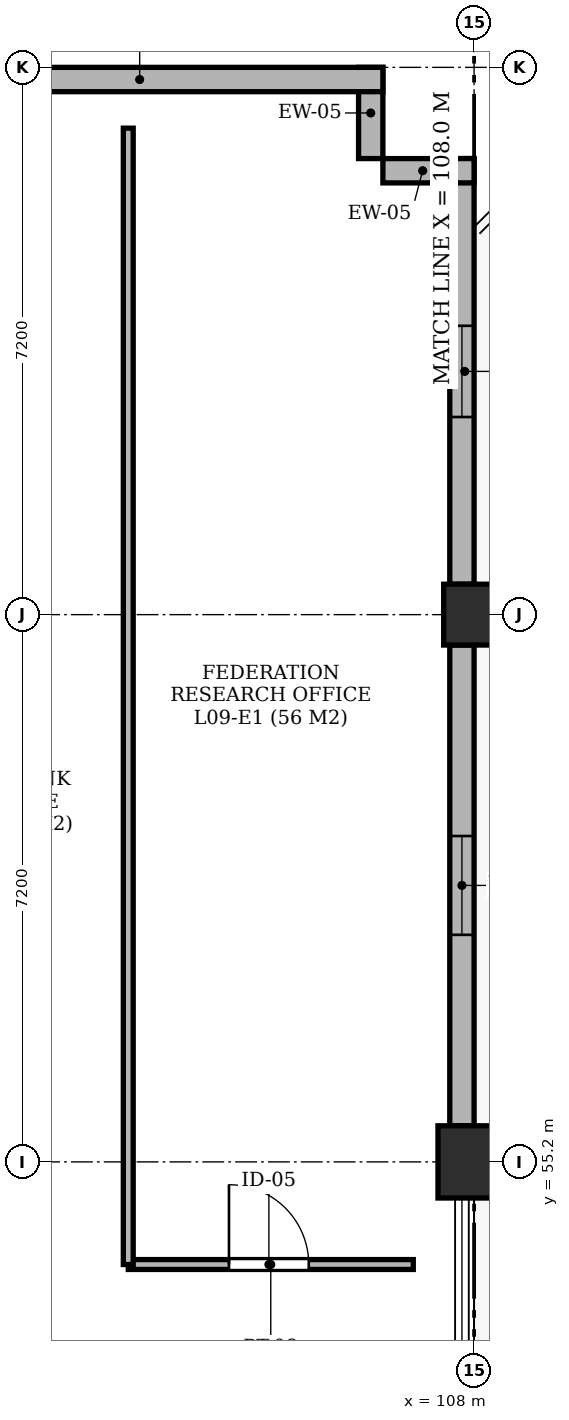
"""IFC4 building model, lengths in metres.
Left out: names, types, materials, properties, quantities, classifications, styles, units other than length and angle.
Written with IfcOpenShell. Run it as: python <this file> out.ifc"""

import sys

from ifc_helpers import new_model, si_unit, direction, frame, frame_2d, origin, origin_2d, place, context, subcontext, project, spatial, rectangle, extrude, element, fill, save


model = new_model("IFC4")
c1 = context("Model", 3, precision=1e-05, world=origin(), true_north=direction((0.0, 1.0)))
c2 = subcontext(c1, "Body", "Model", "MODEL_VIEW")
j1 = project(units=[si_unit("LENGTHUNIT", "METRE"), si_unit("PLANEANGLEUNIT", "RADIAN")], contexts=[c1])
p1 = place(None, origin())
s1 = spatial("IfcSite", under=j1, at=p1, CompositionType="ELEMENT")
p2 = place(p1, origin())
s2 = spatial("IfcBuilding", under=s1, at=p2, CompositionType="ELEMENT")
p3 = place(p2, frame((0.0, 0.0, 40.55)))
s3 = spatial("IfcBuildingStorey", under=s2, at=p3, CompositionType="ELEMENT", Elevation=40.55)
p4 = place(p3, frame((108.0, 55.2, -0.24), z_axis=(0.0, 0.0, 1.0), x_axis=(1.0, 0.0, 0.0)))
e1 = element("IfcColumn", 1, at=p4, inside=s3, PredefinedType="COLUMN", context=c2, shape_type="SweptSolid", body=[
    extrude(rectangle(XDim=0.95, YDim=0.95, at=origin_2d()), origin(), (0.0, 0.0, 1.0), 3.25),
])
p5 = place(p3, frame((108.0, 62.4, -0.24), z_axis=(0.0, 0.0, 1.0), x_axis=(1.0, 0.0, 0.0)))
e2 = element("IfcColumn", 2, at=p5, inside=s3, PredefinedType="COLUMN", context=c2, shape_type="SweptSolid", body=[
    extrude(rectangle(XDim=0.8, YDim=0.8, at=origin_2d()), origin(), (0.0, 0.0, 1.0), 3.25),
])
p6 = place(p3, frame((107.84, 55.675, 0.0), z_axis=(0.0, 0.0, 1.0), x_axis=(0.0, 1.0, 0.0)))
e3 = element("IfcWall", 3, at=p6, inside=s3, PredefinedType="SOLIDWALL", context=c2, shape_type="SweptSolid", body=[
    extrude(rectangle(XDim=6.325, YDim=0.32, at=frame_2d((3.163, 0.0))), origin(), (0.0, 0.0, 1.0), 2.53),
])
p7 = place(p6, frame((2.512, 0.0, 0.62)))
e4 = element("IfcOpeningElement", 4, at=p7, cuts=e3, PredefinedType="OPENING", context=c2, shape_type="SweptSolid", body=[
    extrude(rectangle(XDim=1.3, YDim=1.8, at=frame_2d((0.65, 0.9))), frame((0.0, 0.172, 0.0), z_axis=(0.0, -1.0, 0.0), x_axis=(1.0, 0.0, 0.0)), (0.0, 0.0, 1.0), 0.344),
])
p8 = place(p3, frame((107.84, 62.8, 0.0), z_axis=(0.0, 0.0, 1.0), x_axis=(0.0, 1.0, 0.0)))
e5 = element("IfcWall", 5, at=p8, inside=s3, PredefinedType="SOLIDWALL", context=c2, shape_type="SweptSolid", body=[
    extrude(rectangle(XDim=5.6, YDim=0.32, at=frame_2d((2.8, 0.0))), origin(), (0.0, 0.0, 1.0), 2.53),
])
p9 = place(p8, frame((2.2, 0.0, 0.62)))
e6 = element("IfcOpeningElement", 6, at=p9, cuts=e5, PredefinedType="OPENING", context=c2, shape_type="SweptSolid", body=[
    extrude(rectangle(XDim=1.2, YDim=1.7, at=frame_2d((0.6, 0.85))), frame((0.0, 0.172, 0.0), z_axis=(0.0, -1.0, 0.0), x_axis=(1.0, 0.0, 0.0)), (0.0, 0.0, 1.0), 0.344),
])
p10 = place(p3, frame((108.0, 68.24, 0.0), z_axis=(0.0, 0.0, 1.0), x_axis=(-1.0, 0.0, 0.0)))
e7 = element("IfcWall", 7, at=p10, inside=s3, PredefinedType="SOLIDWALL", context=c2, shape_type="SweptSolid", body=[
    extrude(rectangle(XDim=1.2, YDim=0.32, at=frame_2d((0.6, 0.0))), origin(), (0.0, 0.0, 1.0), 2.53),
])
p11 = place(p3, frame((106.64, 68.4, 0.0), z_axis=(0.0, 0.0, 1.0), x_axis=(0.0, 1.0, 0.0)))
e8 = element("IfcWall", 8, at=p11, inside=s3, PredefinedType="SOLIDWALL", context=c2, shape_type="SweptSolid", body=[
    extrude(rectangle(XDim=1.2, YDim=0.32, at=frame_2d((0.6, 0.0))), origin(), (0.0, 0.0, 1.0), 2.53),
])
p12 = place(p3, frame((106.8, 69.44, 0.0), z_axis=(0.0, 0.0, 1.0), x_axis=(-1.0, 0.0, 0.0)))
e9 = element("IfcWall", 9, at=p12, inside=s3, PredefinedType="SOLIDWALL", context=c2, shape_type="SweptSolid", body=[
    extrude(rectangle(XDim=6.4, YDim=0.32, at=frame_2d((3.2, 0.0))), origin(), (0.0, 0.0, 1.0), 2.53),
])
p13 = place(p12, frame((4.75, 0.0, 0.62)))
e10 = element("IfcOpeningElement", 10, at=p13, cuts=e9, PredefinedType="OPENING", context=c2, shape_type="SweptSolid", body=[
    extrude(rectangle(XDim=1.2, YDim=1.65, at=frame_2d((0.6, 0.825))), frame((0.0, 0.172, 0.0), z_axis=(0.0, -1.0, 0.0), x_axis=(1.0, 0.0, 0.0)), (0.0, 0.0, 1.0), 0.344),
])
p14 = place(p3, frame((103.45, 53.85, 0.0), z_axis=(0.0, 0.0, 1.0), x_axis=(1.0, 0.0, 0.0)))
e11 = element("IfcWall", 11, at=p14, inside=s3, PredefinedType="PARTITIONING", context=c2, shape_type="SweptSolid", body=[
    extrude(rectangle(XDim=3.75, YDim=0.13, at=frame_2d((1.875, 0.0))), origin(), (0.0, 0.0, 1.0), 2.53),
])
p15 = place(p14, frame((1.325, 0.0, 0.0)))
e12 = element("IfcOpeningElement", 12, at=p15, cuts=e11, PredefinedType="OPENING", context=c2, shape_type="SweptSolid", body=[
    extrude(rectangle(XDim=1.05, YDim=2.15, at=frame_2d((0.525, 1.075))), frame((0.0, 0.077, 0.0), z_axis=(0.0, -1.0, 0.0), x_axis=(1.0, 0.0, 0.0)), (0.0, 0.0, 1.0), 0.154),
])
p16 = place(p3, frame((103.45, 53.85, 0.0), z_axis=(0.0, 0.0, 1.0), x_axis=(0.0, 1.0, 0.0)))
e13 = element("IfcWall", 13, at=p16, inside=s3, PredefinedType="PARTITIONING", context=c2, shape_type="SweptSolid", body=[
    extrude(rectangle(XDim=14.95, YDim=0.13, at=frame_2d((7.475, 0.0))), origin(), (0.0, 0.0, 1.0), 2.53),
])
p17 = place(p7, origin())
e14 = element("IfcWindow", 14, at=p17, inside=s3, PartitioningType="SINGLE_PANEL", PredefinedType="WINDOW", context=c2, shape_type="SweptSolid", body=[
    extrude(rectangle(XDim=1.3, YDim=1.8, at=frame_2d((0.65, 0.9))), frame((0.0, 0.03, 0.0), z_axis=(0.0, -1.0, 0.0), x_axis=(1.0, 0.0, 0.0)), (0.0, 0.0, 1.0), 0.06),
])
fill(e4, e14)
p18 = place(p9, origin())
e15 = element("IfcWindow", 15, at=p18, inside=s3, PartitioningType="SINGLE_PANEL", PredefinedType="WINDOW", context=c2, shape_type="SweptSolid", body=[
    extrude(rectangle(XDim=1.2, YDim=1.7, at=frame_2d((0.6, 0.85))), frame((0.0, 0.03, 0.0), z_axis=(0.0, -1.0, 0.0), x_axis=(1.0, 0.0, 0.0)), (0.0, 0.0, 1.0), 0.06),
])
fill(e6, e15)
p19 = place(p15, origin())
e16 = element("IfcDoor", 16, at=p19, inside=s3, OperationType="SINGLE_SWING_LEFT", PredefinedType="DOOR", context=c2, shape_type="SweptSolid", body=[
    extrude(rectangle(XDim=1.05, YDim=2.15, at=frame_2d((0.525, 1.075))), frame((0.0, 0.025, 0.0), z_axis=(0.0, -1.0, 0.0), x_axis=(1.0, 0.0, 0.0)), (0.0, 0.0, 1.0), 0.05),
])
fill(e12, e16)
save(model, sys.argv[1])
